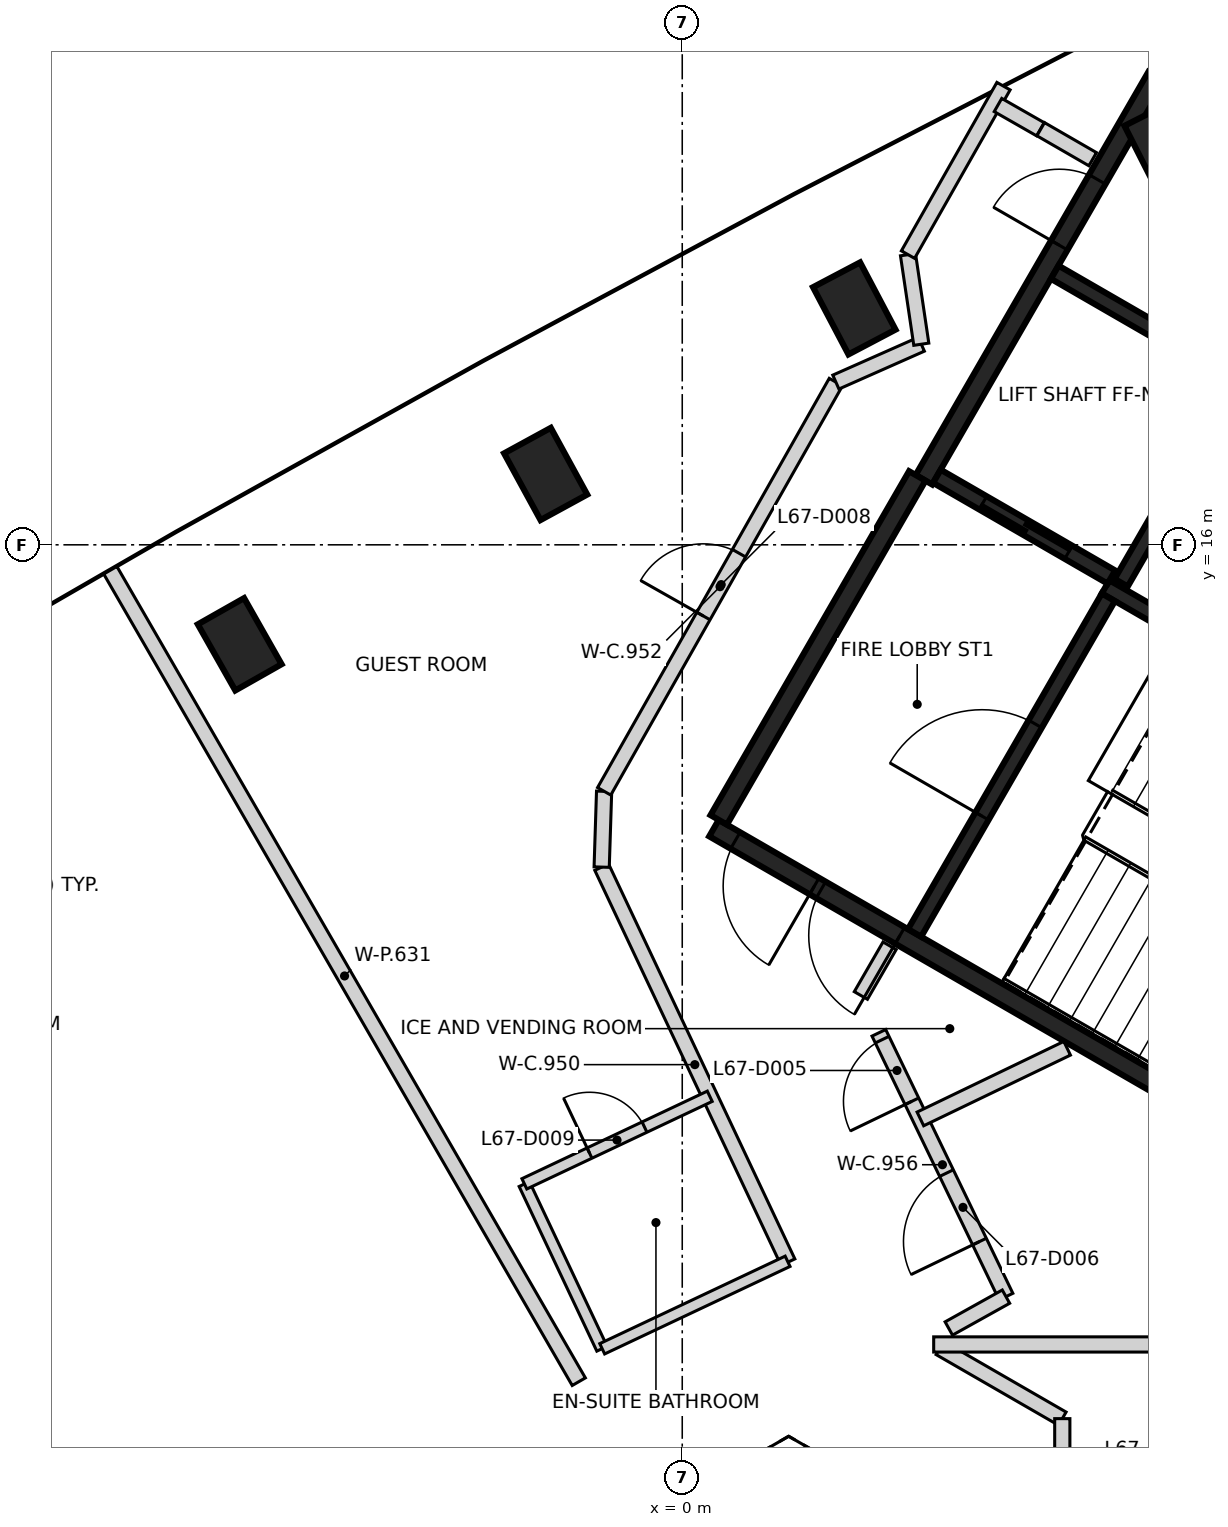
"""IFC4 building model, lengths in metres.
Left out: names, types, materials, properties, quantities, classifications, styles, units other than length and angle.
Written with IfcOpenShell. Run it as: python <this file> out.ifc"""

import sys

from ifc_helpers import new_model, si_unit, direction, frame, frame_2d, origin, origin_2d, place, context, subcontext, project, spatial, rectangle, extrude, element, fill, save


model = new_model("IFC4")
c1 = context("Model", 3, precision=1e-05, world=origin(), true_north=direction((0.0, 1.0)))
c2 = subcontext(c1, "Body", "Model", "MODEL_VIEW")
j1 = project(units=[si_unit("LENGTHUNIT", "METRE"), si_unit("PLANEANGLEUNIT", "RADIAN")], contexts=[c1])
p1 = place(None, origin())
s1 = spatial("IfcSite", under=j1, at=p1, CompositionType="ELEMENT")
p2 = place(p1, origin())
s2 = spatial("IfcBuilding", under=s1, at=p2, CompositionType="ELEMENT")
p3 = place(p2, frame((0.0, 0.0, 265.8)))
s3 = spatial("IfcBuildingStorey", under=s2, at=p3, CompositionType="ELEMENT", Elevation=265.8)
for number, where, z_axis, x_axis in (
    (1, (6.356, 21.224, -0.35), (0.0, 0.0, 1.0), (-0.452, 0.892, 0.0)),
    (2, (2.263, 19.11, -0.35), (0.0, 0.0, 1.0), (-0.466, 0.885, 0.0)),
    (3, (-1.797, 16.932, -0.35), (0.0, 0.0, 1.0), (-0.479, 0.878, 0.0)),
    (4, (-5.822, 14.691, -0.35), (0.0, 0.0, 1.0), (-0.493, 0.87, 0.0)),
):
    element("IfcColumn", number, at=place(p3, frame(where, z_axis=z_axis, x_axis=x_axis)), inside=s3, PredefinedType="COLUMN", context=c2, shape_type="SweptSolid", body=[
        extrude(rectangle(XDim=1.0, YDim=0.7, at=origin_2d()), origin(), (0.0, 0.0, 1.0), 3.6),
    ])
p4 = place(p3, frame((10.42, 6.498, 0.0), z_axis=(0.0, 0.0, 1.0), x_axis=(-0.866021906294, 0.500006057782, 0.0)))
e5 = element("IfcWall", 5, at=p4, inside=s3, PredefinedType="SHEAR", context=c2, shape_type="SweptSolid", body=[
    extrude(rectangle(XDim=11.55, YDim=0.25, at=frame_2d((5.775, 0.0))), origin(), (0.0, 0.0, 1.0), 3.25),
])
p5 = place(p4, frame((10.025, 0.0, 0.0)))
e6 = element("IfcOpeningElement", 6, at=p5, cuts=e5, PredefinedType="OPENING", context=c2, shape_type="SweptSolid", body=[
    extrude(rectangle(XDim=1.2, YDim=2.1, at=frame_2d((0.6, 1.05))), frame((0.0, 0.135, 0.0), z_axis=(0.0, -1.0, 0.0), x_axis=(1.0, 0.0, 0.0)), (0.0, 0.0, 1.0), 0.27),
])
p6 = place(p4, frame((8.725, 0.0, 0.0)))
e7 = element("IfcOpeningElement", 7, at=p6, cuts=e5, PredefinedType="OPENING", context=c2, shape_type="SweptSolid", body=[
    extrude(rectangle(XDim=1.2, YDim=2.1, at=frame_2d((0.6, 1.05))), frame((0.0, 0.135, 0.0), z_axis=(0.0, -1.0, 0.0), x_axis=(1.0, 0.0, 0.0)), (0.0, 0.0, 1.0), 0.27),
])
p7 = place(p3, frame((3.179, 16.856, 0.0), z_axis=(0.0, 0.0, 1.0), x_axis=(0.500001955336, 0.866024274868, 0.0)))
e8 = element("IfcWall", 8, at=p7, inside=s3, PredefinedType="SHEAR", context=c2, shape_type="SweptSolid", body=[
    extrude(rectangle(XDim=6.125, YDim=0.25, at=frame_2d((3.062, 0.0))), origin(), (0.0, 0.0, 1.0), 3.25),
])
p8 = place(p7, frame((3.563, 0.0, 0.0)))
e9 = element("IfcOpeningElement", 9, at=p8, cuts=e8, PredefinedType="OPENING", context=c2, shape_type="SweptSolid", body=[
    extrude(rectangle(XDim=1.0, YDim=2.1, at=frame_2d((0.5, 1.05))), frame((0.0, 0.135, 0.0), z_axis=(0.0, -1.0, 0.0), x_axis=(1.0, 0.0, 0.0)), (0.0, 0.0, 1.0), 0.27),
])
p9 = place(p3, frame((0.48, 12.381, 0.0), z_axis=(0.0, 0.0, 1.0), x_axis=(0.49999885962, 0.866026062182, 0.0)))
e10 = element("IfcWall", 10, at=p9, inside=s3, PredefinedType="SHEAR", context=c2, shape_type="SweptSolid", body=[
    extrude(rectangle(XDim=5.225, YDim=0.25, at=frame_2d((2.612, 0.0))), origin(), (0.0, 0.0, 1.0), 3.25),
])
p10 = place(p3, frame((10.743, 12.46, 0.0), z_axis=(0.0, 0.0, 1.0), x_axis=(-0.866018848283, 0.500011354289, 0.0)))
e11 = element("IfcWall", 11, at=p10, inside=s3, PredefinedType="SHEAR", context=c2, shape_type="SweptSolid", body=[
    extrude(rectangle(XDim=5.974, YDim=0.2, at=frame_2d((2.987, 0.0))), origin(), (0.0, 0.0, 1.0), 3.25),
])
p11 = place(p3, frame((3.057, 10.895, 0.0), z_axis=(0.0, 0.0, 1.0), x_axis=(0.500027839223, 0.866009330205, 0.0)))
e12 = element("IfcWall", 12, at=p11, inside=s3, PredefinedType="SHEAR", context=c2, shape_type="SweptSolid", body=[
    extrude(rectangle(XDim=5.098, YDim=0.2, at=frame_2d((2.549, 0.0))), origin(), (0.0, 0.0, 1.0), 3.25),
])
p12 = place(p11, frame((1.774, 0.0, 0.0)))
e13 = element("IfcOpeningElement", 13, at=p12, cuts=e12, PredefinedType="OPENING", context=c2, shape_type="SweptSolid", body=[
    extrude(rectangle(XDim=1.4, YDim=2.1, at=frame_2d((0.7, 1.05))), frame((0.0, 0.11, 0.0), z_axis=(0.0, -1.0, 0.0), x_axis=(1.0, 0.0, 0.0)), (0.0, 0.0, 1.0), 0.22),
])
p13 = place(p3, frame((7.324, 18.187, 0.0), z_axis=(0.0, 0.0, 1.0), x_axis=(-0.499967891604, -0.866043940782, 0.0)))
e14 = element("IfcWall", 14, at=p13, inside=s3, PredefinedType="SHEAR", context=c2, shape_type="SweptSolid", body=[
    extrude(rectangle(XDim=3.1, YDim=0.2, at=frame_2d((1.55, 0.0))), origin(), (0.0, 0.0, 1.0), 3.25),
])
p14 = place(p3, frame((5.646, 15.576, 0.0), z_axis=(0.0, 0.0, 1.0), x_axis=(-0.866018407898, 0.500012117035, 0.0)))
e15 = element("IfcWall", 15, at=p14, inside=s3, PredefinedType="SHEAR", context=c2, shape_type="SweptSolid", body=[
    extrude(rectangle(XDim=2.651, YDim=0.2, at=frame_2d((1.325, 0.0))), origin(), (0.0, 0.0, 1.0), 3.25),
])
p15 = place(p14, frame((0.652, 0.0, 0.0)))
e16 = element("IfcOpeningElement", 16, at=p15, cuts=e15, PredefinedType="OPENING", context=c2, shape_type="SweptSolid", body=[
    extrude(rectangle(XDim=1.3, YDim=2.1, at=frame_2d((0.65, 1.05))), frame((0.0, 0.11, 0.0), z_axis=(0.0, -1.0, 0.0), x_axis=(1.0, 0.0, 0.0)), (0.0, 0.0, 1.0), 0.22),
])
p16 = place(p3, frame((7.196, 18.26, 0.0), z_axis=(0.0, 0.0, 1.0), x_axis=(-0.866018407898, 0.500012117035, 0.0)))
e17 = element("IfcWall", 17, at=p16, inside=s3, PredefinedType="SHEAR", context=c2, shape_type="SweptSolid", body=[
    extrude(rectangle(XDim=2.651, YDim=0.2, at=frame_2d((1.325, 0.0))), origin(), (0.0, 0.0, 1.0), 3.25),
])
p17 = place(p3, frame((-1.06, 11.76, 0.0), z_axis=(0.0, 0.0, 1.0), x_axis=(0.426549824954, -0.904464066081, 0.0)))
e18 = element("IfcWall", 18, at=p17, inside=s3, PredefinedType="PARTITIONING", context=c2, shape_type="SweptSolid", body=[
    extrude(rectangle(XDim=5.747, YDim=0.2, at=frame_2d((2.873, 0.0))), origin(), (0.0, 0.0, 1.0), 3.25),
])
p18 = place(p3, frame((-1.06, 11.76, 0.0), z_axis=(0.0, 0.0, 1.0), x_axis=(0.032059906789, 0.999485949064, 0.0)))
e19 = element("IfcWall", 19, at=p18, inside=s3, PredefinedType="PARTITIONING", context=c2, shape_type="SweptSolid", body=[
    extrude(rectangle(XDim=0.998, YDim=0.2, at=frame_2d((0.499, 0.0))), origin(), (0.0, 0.0, 1.0), 3.25),
])
p19 = place(p3, frame((-1.027, 12.757, 0.0), z_axis=(0.0, 0.0, 1.0), x_axis=(0.492663063759, 0.870220147783, 0.0)))
e20 = element("IfcWall", 20, at=p19, inside=s3, PredefinedType="PARTITIONING", context=c2, shape_type="SweptSolid", body=[
    extrude(rectangle(XDim=6.187, YDim=0.2, at=frame_2d((3.094, 0.0))), origin(), (0.0, 0.0, 1.0), 3.25),
])
p20 = place(p19, frame((2.65, 0.0, 0.0)))
e21 = element("IfcOpeningElement", 21, at=p20, cuts=e20, PredefinedType="OPENING", context=c2, shape_type="SweptSolid", body=[
    extrude(rectangle(XDim=0.95, YDim=2.1, at=frame_2d((0.475, 1.05))), frame((0.0, 0.11, 0.0), z_axis=(0.0, -1.0, 0.0), x_axis=(1.0, 0.0, 0.0)), (0.0, 0.0, 1.0), 0.22),
])
p21 = place(p3, frame((2.021, 18.141, 0.0), z_axis=(0.0, 0.0, 1.0), x_axis=(0.914343087003, 0.404940389748, 0.0)))
e22 = element("IfcWall", 22, at=p21, inside=s3, PredefinedType="PARTITIONING", context=c2, shape_type="SweptSolid", body=[
    extrude(rectangle(XDim=1.229, YDim=0.2, at=frame_2d((0.615, 0.0))), origin(), (0.0, 0.0, 1.0), 3.25),
])
p22 = place(p3, frame((2.35, 10.071, 0.0), z_axis=(0.0, 0.0, 1.0), x_axis=(0.500309905322, 0.865846405916, 0.0)))
e23 = element("IfcWall", 23, at=p22, inside=s3, PredefinedType="PARTITIONING", context=c2, shape_type="SweptSolid", body=[
    extrude(rectangle(XDim=0.755, YDim=0.2, at=frame_2d((0.378, 0.0))), origin(), (0.0, 0.0, 1.0), 3.25),
])
p23 = place(p3, frame((4.26, 6.109, 0.0), z_axis=(0.0, 0.0, 1.0), x_axis=(-0.434189007872, 0.900821794498, 0.0)))
e24 = element("IfcWall", 24, at=p23, inside=s3, PredefinedType="PARTITIONING", context=c2, shape_type="SweptSolid", body=[
    extrude(rectangle(XDim=3.853, YDim=0.2, at=frame_2d((1.926, 0.0))), origin(), (0.0, 0.0, 1.0), 3.25),
])
p24 = place(p23, frame((2.853, 0.0, 0.0)))
e25 = element("IfcOpeningElement", 25, at=p24, cuts=e24, PredefinedType="OPENING", context=c2, shape_type="SweptSolid", body=[
    extrude(rectangle(XDim=0.9, YDim=2.1, at=frame_2d((0.45, 1.05))), frame((0.0, 0.11, 0.0), z_axis=(0.0, -1.0, 0.0), x_axis=(1.0, 0.0, 0.0)), (0.0, 0.0, 1.0), 0.22),
])
p25 = place(p23, frame((0.804, 0.0, 0.0)))
e26 = element("IfcOpeningElement", 26, at=p25, cuts=e24, PredefinedType="OPENING", context=c2, shape_type="SweptSolid", body=[
    extrude(rectangle(XDim=1.0, YDim=2.1, at=frame_2d((0.5, 1.05))), frame((0.0, 0.11, 0.0), z_axis=(0.0, -1.0, 0.0), x_axis=(1.0, 0.0, 0.0)), (0.0, 0.0, 1.0), 0.22),
])
p26 = place(p3, frame((2.97, 19.817, 0.0), z_axis=(0.0, 0.0, 1.0), x_axis=(0.146986994932, -0.989138424752, 0.0)))
e27 = element("IfcWall", 27, at=p26, inside=s3, PredefinedType="PARTITIONING", context=c2, shape_type="SweptSolid", body=[
    extrude(rectangle(XDim=1.191, YDim=0.2, at=frame_2d((0.595, 0.0))), origin(), (0.0, 0.0, 1.0), 2.35),
])
p27 = place(p3, frame((2.97, 19.818, 0.0), z_axis=(0.0, 0.0, 1.0), x_axis=(0.493215654548, 0.86990707441, 0.0)))
e28 = element("IfcWall", 28, at=p27, inside=s3, PredefinedType="PARTITIONING", context=c2, shape_type="SweptSolid", body=[
    extrude(rectangle(XDim=2.548, YDim=0.2, at=frame_2d((1.274, 0.0))), origin(), (0.0, 0.0, 1.0), 3.25),
])
p28 = place(p3, frame((3.39, 5.433, 0.0), z_axis=(0.0, 0.0, 1.0), x_axis=(0.866117799835, -0.499839931186, 0.0)))
e29 = element("IfcWall", 29, at=p28, inside=s3, PredefinedType="PARTITIONING", context=c2, shape_type="SweptSolid", body=[
    extrude(rectangle(XDim=1.859, YDim=0.2, at=frame_2d((0.929, 0.0))), origin(), (0.0, 0.0, 1.0), 3.25),
])
p29 = place(p3, frame((3.507, 5.69, 0.0), z_axis=(0.0, 0.0, 1.0), x_axis=(0.873567976284, 0.486702158215, 0.0)))
e30 = element("IfcWall", 30, at=p29, inside=s3, PredefinedType="PARTITIONING", context=c2, shape_type="SweptSolid", body=[
    extrude(rectangle(XDim=0.861, YDim=0.2, at=frame_2d((0.43, 0.0))), origin(), (0.0, 0.0, 1.0), 3.25),
])
p30 = place(p3, frame((4.154, 21.786, 0.0), z_axis=(0.0, 0.0, 1.0), x_axis=(0.868196374619, -0.496220772539, 0.0)))
e31 = element("IfcWall", 31, at=p30, inside=s3, PredefinedType="PARTITIONING", context=c2, shape_type="SweptSolid", body=[
    extrude(rectangle(XDim=0.643, YDim=0.2, at=frame_2d((0.321, 0.0))), origin(), (0.0, 0.0, 1.0), 3.25),
])
p31 = place(p3, frame((4.716, 21.468, 0.0), z_axis=(0.0, 0.0, 1.0), x_axis=(0.865912682783, -0.500195187698, 0.0)))
e32 = element("IfcWall", 32, at=p31, inside=s3, PredefinedType="PARTITIONING", context=c2, shape_type="SweptSolid", body=[
    extrude(rectangle(XDim=0.79, YDim=0.2, at=frame_2d((0.395, 0.0))), origin(), (0.0, 0.0, 1.0), 3.25),
])
p32 = place(p3, frame((5.0, -1.707, 0.0), z_axis=(0.0, 0.0, 1.0), x_axis=(0.0, 1.0, 0.0)))
e33 = element("IfcWall", 33, at=p32, inside=s3, PredefinedType="PARTITIONING", context=c2, shape_type="SweptSolid", body=[
    extrude(rectangle(XDim=6.211, YDim=0.2, at=frame_2d((3.105, 0.0))), origin(), (0.0, 0.0, 1.0), 3.25),
])
p33 = place(p32, frame((4.605, 0.0, 0.0)))
e34 = element("IfcOpeningElement", 34, at=p33, cuts=e33, PredefinedType="OPENING", context=c2, shape_type="SweptSolid", body=[
    extrude(rectangle(XDim=1.0, YDim=2.1, at=frame_2d((0.5, 1.05))), frame((0.0, 0.11, 0.0), z_axis=(0.0, -1.0, 0.0), x_axis=(1.0, 0.0, 0.0)), (0.0, 0.0, 1.0), 0.22),
])
p34 = place(p3, frame((-7.524, 15.666, 0.0), z_axis=(0.0, 0.0, 1.0), x_axis=(0.499979611936, -0.866037174519, 0.0)))
e35 = element("IfcWall", 35, at=p34, inside=s3, PredefinedType="PARTITIONING", context=c2, shape_type="SweptSolid", body=[
    extrude(rectangle(XDim=12.327, YDim=0.2, at=frame_2d((6.164, 0.0))), origin(), (0.0, 0.0, 1.0), 2.35),
])
p35 = place(p3, frame((3.133, 8.447, 0.0), z_axis=(0.0, 0.0, 1.0), x_axis=(0.900981876458, 0.433856725538, 0.0)))
e36 = element("IfcWall", 36, at=p35, inside=s3, PredefinedType="PARTITIONING", context=c2, shape_type="SweptSolid", body=[
    extrude(rectangle(XDim=2.143, YDim=0.2, at=frame_2d((1.071, 0.0))), origin(), (0.0, 0.0, 1.0), 3.25),
])
p36 = place(p3, frame((3.308, 5.48, 0.0), z_axis=(0.0, 0.0, 1.0), x_axis=(1.0, 0.0, 0.0)))
e37 = element("IfcWall", 37, at=p36, inside=s3, PredefinedType="PARTITIONING", context=c2, shape_type="SweptSolid", body=[
    extrude(rectangle(XDim=13.971, YDim=0.2, at=frame_2d((6.986, 0.0))), origin(), (0.0, 0.0, 1.0), 2.35),
])
p37 = place(p3, frame((-2.078, 7.59, 0.0), z_axis=(0.0, 0.0, 1.0), x_axis=(0.426709924428, -0.904388545037, 0.0)))
e38 = element("IfcWall", 38, at=p37, inside=s3, PredefinedType="PARTITIONING", context=c2, shape_type="SweptSolid", body=[
    extrude(rectangle(XDim=2.395, YDim=0.15, at=frame_2d((1.198, 0.0))), origin(), (0.0, 0.0, 1.0), 3.25),
])
p38 = place(p3, frame((-2.077, 7.593, 0.0), z_axis=(0.0, 0.0, 1.0), x_axis=(0.904196218291, 0.427117312724, 0.0)))
e39 = element("IfcWall", 39, at=p38, inside=s3, PredefinedType="PARTITIONING", context=c2, shape_type="SweptSolid", body=[
    extrude(rectangle(XDim=2.697, YDim=0.15, at=frame_2d((1.349, 0.0))), origin(), (0.0, 0.0, 1.0), 3.25),
])
p39 = place(p38, frame((0.948, 0.0, 0.0)))
e40 = element("IfcOpeningElement", 40, at=p39, cuts=e39, PredefinedType="OPENING", context=c2, shape_type="SweptSolid", body=[
    extrude(rectangle(XDim=0.8, YDim=2.1, at=frame_2d((0.4, 1.05))), frame((0.0, 0.085, 0.0), z_axis=(0.0, -1.0, 0.0), x_axis=(1.0, 0.0, 0.0)), (0.0, 0.0, 1.0), 0.17),
])
p40 = place(p3, frame((-1.053, 5.423, 0.0), z_axis=(0.0, 0.0, 1.0), x_axis=(0.904370950432, 0.426747213247, 0.0)))
e41 = element("IfcWall", 41, at=p40, inside=s3, PredefinedType="PARTITIONING", context=c2, shape_type="SweptSolid", body=[
    extrude(rectangle(XDim=2.697, YDim=0.15, at=frame_2d((1.348, 0.0))), origin(), (0.0, 0.0, 1.0), 3.25),
])
p41 = place(p15, origin())
e42 = element("IfcDoor", 42, at=p41, inside=s3, OperationType="SLIDING_TO_RIGHT", PredefinedType="DOOR", context=c2, shape_type="SweptSolid", body=[
    extrude(rectangle(XDim=1.3, YDim=2.1, at=frame_2d((0.65, 1.05))), frame((0.0, 0.025, 0.0), z_axis=(0.0, -1.0, 0.0), x_axis=(1.0, 0.0, 0.0)), (0.0, 0.0, 1.0), 0.05),
])
fill(e16, e42)
p42 = place(p8, origin())
e43 = element("IfcDoor", 43, at=p42, inside=s3, OperationType="SINGLE_SWING_LEFT", PredefinedType="DOOR", context=c2, shape_type="SweptSolid", body=[
    extrude(rectangle(XDim=1.0, YDim=2.1, at=frame_2d((0.5, 1.05))), frame((0.0, 0.025, 0.0), z_axis=(0.0, -1.0, 0.0), x_axis=(1.0, 0.0, 0.0)), (0.0, 0.0, 1.0), 0.05),
])
fill(e9, e43)
p43 = place(p5, origin())
e44 = element("IfcDoor", 44, at=p43, inside=s3, OperationType="SINGLE_SWING_LEFT", PredefinedType="DOOR", context=c2, shape_type="SweptSolid", body=[
    extrude(rectangle(XDim=1.2, YDim=2.1, at=frame_2d((0.6, 1.05))), frame((0.0, 0.025, 0.0), z_axis=(0.0, -1.0, 0.0), x_axis=(1.0, 0.0, 0.0)), (0.0, 0.0, 1.0), 0.05),
])
fill(e6, e44)
p44 = place(p6, origin())
e45 = element("IfcDoor", 45, at=p44, inside=s3, OperationType="SINGLE_SWING_RIGHT", PredefinedType="DOOR", context=c2, shape_type="SweptSolid", body=[
    extrude(rectangle(XDim=1.2, YDim=2.1, at=frame_2d((0.6, 1.05))), frame((0.0, 0.025, 0.0), z_axis=(0.0, -1.0, 0.0), x_axis=(1.0, 0.0, 0.0)), (0.0, 0.0, 1.0), 0.05),
])
fill(e7, e45)
p45 = place(p12, origin())
e46 = element("IfcDoor", 46, at=p45, inside=s3, OperationType="SINGLE_SWING_RIGHT", PredefinedType="DOOR", context=c2, shape_type="SweptSolid", body=[
    extrude(rectangle(XDim=1.4, YDim=2.1, at=frame_2d((0.7, 1.05))), frame((0.0, 0.025, 0.0), z_axis=(0.0, -1.0, 0.0), x_axis=(1.0, 0.0, 0.0)), (0.0, 0.0, 1.0), 0.05),
])
fill(e13, e46)
p46 = place(p24, origin())
e47 = element("IfcDoor", 47, at=p46, inside=s3, OperationType="SINGLE_SWING_LEFT", PredefinedType="DOOR", context=c2, shape_type="SweptSolid", body=[
    extrude(rectangle(XDim=0.9, YDim=2.1, at=frame_2d((0.45, 1.05))), frame((0.0, 0.025, 0.0), z_axis=(0.0, -1.0, 0.0), x_axis=(1.0, 0.0, 0.0)), (0.0, 0.0, 1.0), 0.05),
])
fill(e25, e47)
p47 = place(p25, origin())
e48 = element("IfcDoor", 48, at=p47, inside=s3, OperationType="SINGLE_SWING_LEFT", PredefinedType="DOOR", context=c2, shape_type="SweptSolid", body=[
    extrude(rectangle(XDim=1.0, YDim=2.1, at=frame_2d((0.5, 1.05))), frame((0.0, 0.025, 0.0), z_axis=(0.0, -1.0, 0.0), x_axis=(1.0, 0.0, 0.0)), (0.0, 0.0, 1.0), 0.05),
])
fill(e26, e48)
p48 = place(p20, origin())
e49 = element("IfcDoor", 49, at=p48, inside=s3, OperationType="SINGLE_SWING_LEFT", PredefinedType="DOOR", context=c2, shape_type="SweptSolid", body=[
    extrude(rectangle(XDim=0.95, YDim=2.1, at=frame_2d((0.475, 1.05))), frame((0.0, 0.025, 0.0), z_axis=(0.0, -1.0, 0.0), x_axis=(1.0, 0.0, 0.0)), (0.0, 0.0, 1.0), 0.05),
])
fill(e21, e49)
p49 = place(p39, origin())
e50 = element("IfcDoor", 50, at=p49, inside=s3, OperationType="SINGLE_SWING_LEFT", PredefinedType="DOOR", context=c2, shape_type="SweptSolid", body=[
    extrude(rectangle(XDim=0.8, YDim=2.1, at=frame_2d((0.4, 1.05))), frame((0.0, 0.025, 0.0), z_axis=(0.0, -1.0, 0.0), x_axis=(1.0, 0.0, 0.0)), (0.0, 0.0, 1.0), 0.05),
])
fill(e40, e50)
save(model, sys.argv[1])
